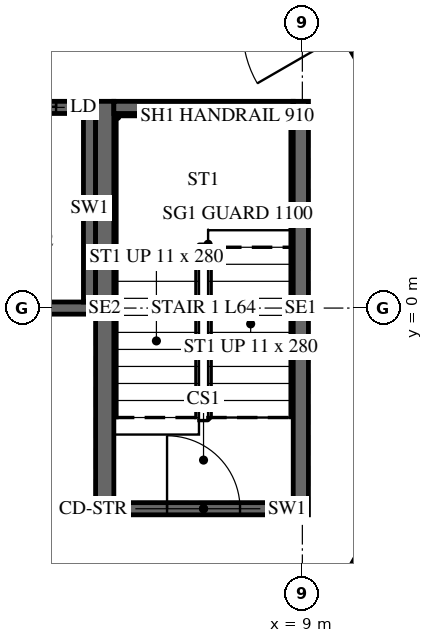
"""IFC4 building model, lengths in metres.
Left out: names, types, materials, properties, quantities, classifications, styles, units other than length and angle.
Written with IfcOpenShell. Run it as: python <this file> out.ifc"""

import sys

from ifc_helpers import new_model, si_unit, direction, frame, frame_2d, origin, place, context, subcontext, project, spatial, polyline, rectangle, outline, extrude, element, fill, save


model = new_model("IFC4")
c1 = context("Model", 3, precision=1e-05, world=origin(), true_north=direction((0.0, 1.0)))
c2 = subcontext(c1, "Body", "Model", "MODEL_VIEW")
j1 = project(units=[si_unit("LENGTHUNIT", "METRE"), si_unit("PLANEANGLEUNIT", "RADIAN")], contexts=[c1])
p1 = place(None, origin())
s1 = spatial("IfcSite", under=j1, at=p1, CompositionType="ELEMENT")
p2 = place(p1, origin())
s2 = spatial("IfcBuilding", under=s1, at=p2, CompositionType="ELEMENT")
p3 = place(p2, frame((0.0, 0.0, 267.9)))
s3 = spatial("IfcBuildingStorey", under=s2, at=p3, CompositionType="ELEMENT", Elevation=267.9)
p4 = place(p3, frame((6.235, -10.8, -0.15), z_axis=(0.0, 0.0, 1.0), x_axis=(0.499996419489, 0.866027470984, 0.0)))
e1 = element("IfcWall", 1, at=p4, inside=s3, PredefinedType="SHEAR", context=c2, shape_type="SweptSolid", body=[
    extrude(outline(polyline([(-0.115, -0.2), (12.586, -0.2), (12.355, 0.2), (0.115, 0.2), (-0.115, -0.2)])), origin(), (0.0, 0.0, 1.0), 3.9),
])
p5 = place(p4, frame((5.364, 0.0, 0.15)))
e2 = element("IfcOpeningElement", 2, at=p5, cuts=e1, PredefinedType="OPENING", context=c2, shape_type="SweptSolid", body=[
    extrude(rectangle(XDim=1.8, YDim=2.4, at=frame_2d((0.9, 1.2))), frame((0.0, 0.21, 0.0), z_axis=(0.0, -1.0, 0.0), x_axis=(1.0, 0.0, 0.0)), (0.0, 0.0, 1.0), 0.42),
])
p6 = place(p3, frame((12.471, 0.0, -0.15), z_axis=(0.0, 0.0, 1.0), x_axis=(-0.499996419489, 0.866027470984, 0.0)))
e3 = element("IfcWall", 3, at=p6, inside=s3, PredefinedType="SHEAR", context=c2, shape_type="SweptSolid", body=[
    extrude(outline(polyline([(-0.115, -0.2), (12.586, -0.2), (12.355, 0.2), (0.115, 0.2), (-0.115, -0.2)])), origin(), (0.0, 0.0, 1.0), 3.9),
])
p7 = place(p6, frame((5.306, 0.0, 0.15)))
e4 = element("IfcOpeningElement", 4, at=p7, cuts=e3, PredefinedType="OPENING", context=c2, shape_type="SweptSolid", body=[
    extrude(rectangle(XDim=1.8, YDim=2.4, at=frame_2d((0.9, 1.2))), frame((0.0, 0.21, 0.0), z_axis=(0.0, -1.0, 0.0), x_axis=(1.0, 0.0, 0.0)), (0.0, 0.0, 1.0), 0.42),
])
p8 = place(p3, frame((3.4, 3.3, -0.25), z_axis=(0.0, 0.0, 1.0), x_axis=(1.0, 0.0, 0.0)))
e5 = element("IfcWall", 5, at=p8, inside=s3, PredefinedType="SHEAR", context=c2, shape_type="SweptSolid", body=[
    extrude(rectangle(XDim=2.2, YDim=0.2, at=frame_2d((1.1, 0.0))), origin(), (0.0, 0.0, 1.0), 3.9),
])
p9 = place(p8, frame((0.45, 0.0, 0.25)))
e6 = element("IfcOpeningElement", 6, at=p9, cuts=e5, PredefinedType="OPENING", context=c2, shape_type="SweptSolid", body=[
    extrude(rectangle(XDim=1.1, YDim=2.1, at=frame_2d((0.55, 1.05))), frame((0.0, 0.11, 0.0), z_axis=(0.0, -1.0, 0.0), x_axis=(1.0, 0.0, 0.0)), (0.0, 0.0, 1.0), 0.22),
])
p10 = place(p3, frame((-5.6, 0.0, -0.25), z_axis=(0.0, 0.0, 1.0), x_axis=(1.0, 0.0, 0.0)))
e7 = element("IfcWall", 7, at=p10, inside=s3, PredefinedType="SHEAR", context=c2, shape_type="SweptSolid", body=[
    extrude(rectangle(XDim=11.2, YDim=0.2, at=frame_2d((5.6, 0.0))), origin(), (0.0, 0.0, 1.0), 3.9),
])
p11 = place(p3, frame((5.5, 0.1, -0.25), z_axis=(0.0, 0.0, 1.0), x_axis=(0.0, 1.0, 0.0)))
e8 = element("IfcWall", 8, at=p11, inside=s3, PredefinedType="SHEAR", context=c2, shape_type="SweptSolid", body=[
    extrude(rectangle(XDim=3.1, YDim=0.2, at=frame_2d((1.55, 0.0))), origin(), (0.0, 0.0, 1.0), 3.9),
])
p12 = place(p3, frame((5.75, -3.4, -0.25), z_axis=(0.0, 0.0, 1.0), x_axis=(0.0, 1.0, 0.0)))
e9 = element("IfcWall", 9, at=p12, inside=s3, PredefinedType="SHEAR", context=c2, shape_type="SweptSolid", body=[
    extrude(rectangle(XDim=6.8, YDim=0.3, at=frame_2d((3.4, 0.0))), origin(), (0.0, 0.0, 1.0), 3.9),
])
p13 = place(p3, frame((8.975, -3.4, -0.25), z_axis=(0.0, 0.0, 1.0), x_axis=(0.0, 1.0, 0.0)))
e10 = element("IfcWall", 10, at=p13, inside=s3, PredefinedType="SHEAR", context=c2, shape_type="SweptSolid", body=[
    extrude(rectangle(XDim=6.8, YDim=0.25, at=frame_2d((3.4, 0.0))), origin(), (0.0, 0.0, 1.0), 3.9),
])
p14 = place(p3, frame((5.9, 3.3, -0.25), z_axis=(0.0, 0.0, 1.0), x_axis=(1.0, 0.0, 0.0)))
e11 = element("IfcWall", 11, at=p14, inside=s3, PredefinedType="SHEAR", context=c2, shape_type="SweptSolid", body=[
    extrude(rectangle(XDim=2.95, YDim=0.2, at=frame_2d((1.475, 0.0))), origin(), (0.0, 0.0, 1.0), 3.9),
])
p15 = place(p3, frame((5.9, -3.3, -0.25), z_axis=(0.0, 0.0, 1.0), x_axis=(1.0, 0.0, 0.0)))
e12 = element("IfcWall", 12, at=p15, inside=s3, PredefinedType="SHEAR", context=c2, shape_type="SweptSolid", body=[
    extrude(rectangle(XDim=2.95, YDim=0.2, at=frame_2d((1.475, 0.0))), origin(), (0.0, 0.0, 1.0), 3.9),
])
p16 = place(p15, frame((0.875, 0.0, 0.25)))
e13 = element("IfcOpeningElement", 13, at=p16, cuts=e12, PredefinedType="OPENING", context=c2, shape_type="SweptSolid", body=[
    extrude(rectangle(XDim=1.2, YDim=2.4, at=frame_2d((0.6, 1.2))), frame((0.0, 0.11, 0.0), z_axis=(0.0, -1.0, 0.0), x_axis=(1.0, 0.0, 0.0)), (0.0, 0.0, 1.0), 0.22),
])
p17 = place(p3, frame((18.875, -1.158, 0.0), z_axis=(0.0, 0.0, 1.0), x_axis=(-0.55919880344, 0.829033592945, 0.0)))
e14 = element("IfcWall", 14, at=p17, inside=s3, PredefinedType="PARTITIONING", context=c2, shape_type="SweptSolid", body=[
    extrude(rectangle(XDim=16.939, YDim=0.15, at=frame_2d((8.47, 0.0))), origin(), (0.0, 0.0, 1.0), 2.988),
])
p18 = place(p17, frame((9.69, 0.0, 0.0)))
e15 = element("IfcOpeningElement", 15, at=p18, cuts=e14, PredefinedType="OPENING", context=c2, shape_type="SweptSolid", body=[
    extrude(rectangle(XDim=1.0, YDim=2.1, at=frame_2d((0.5, 1.05))), frame((0.0, 0.085, 0.0), z_axis=(0.0, -1.0, 0.0), x_axis=(1.0, 0.0, 0.0)), (0.0, 0.0, 1.0), 0.17),
])
p19 = place(p16, origin())
e16 = element("IfcDoor", 16, at=p19, inside=s3, OperationType="SINGLE_SWING_LEFT", PredefinedType="DOOR", context=c2, shape_type="SweptSolid", body=[
    extrude(rectangle(XDim=1.2, YDim=2.4, at=frame_2d((0.6, 1.2))), frame((0.0, 0.025, 0.0), z_axis=(0.0, -1.0, 0.0), x_axis=(1.0, 0.0, 0.0)), (0.0, 0.0, 1.0), 0.05),
])
fill(e13, e16)
p20 = place(p9, origin())
e17 = element("IfcDoor", 17, at=p20, inside=s3, OperationType="SLIDING_TO_LEFT", PredefinedType="DOOR", context=c2, shape_type="SweptSolid", body=[
    extrude(rectangle(XDim=1.1, YDim=2.1, at=frame_2d((0.55, 1.05))), frame((0.0, 0.025, 0.0), z_axis=(0.0, -1.0, 0.0), x_axis=(1.0, 0.0, 0.0)), (0.0, 0.0, 1.0), 0.05),
])
fill(e6, e17)
save(model, sys.argv[1])
